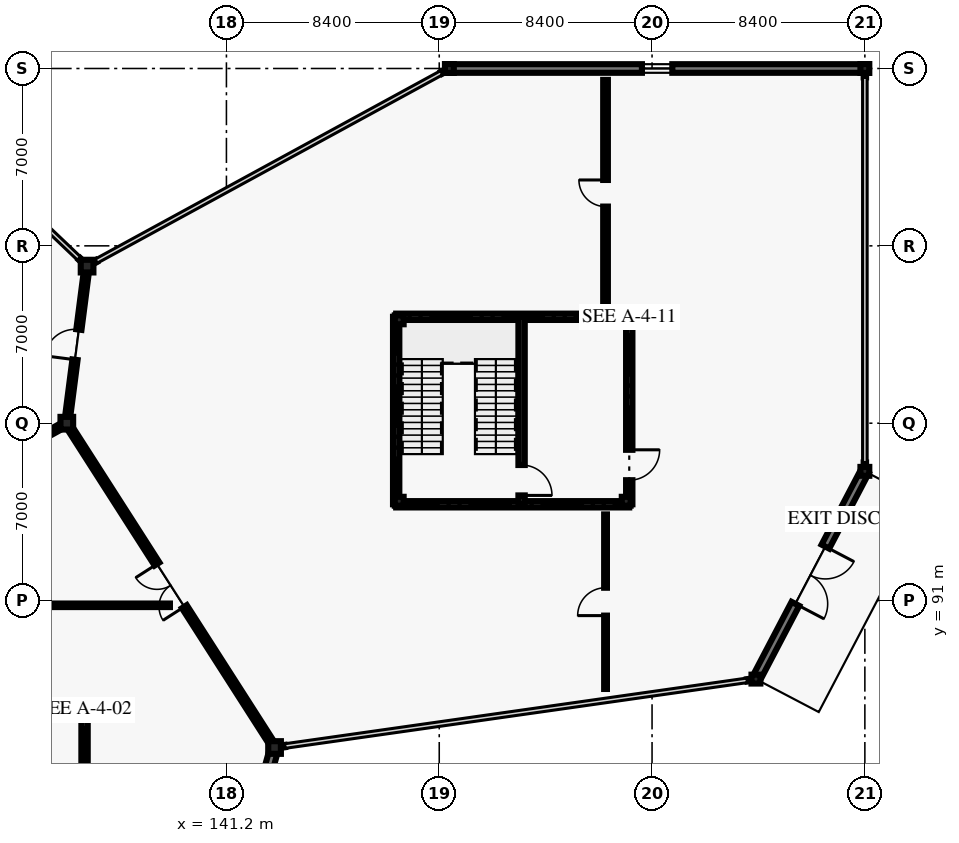
"""IFC4 building model, lengths in metres.
Left out: names, types, materials, properties, quantities, classifications, styles, units other than length and angle.
Written with IfcOpenShell. Run it as: python <this file> out.ifc"""

import sys

from ifc_helpers import new_model, si_unit, direction, frame, frame_2d, origin, origin_2d, place, context, subcontext, project, spatial, rectangle, i_section, extrude, element, fill, save


model = new_model("IFC4")
c1 = context("Model", 3, precision=1e-05, world=origin(), true_north=direction((0.0, 1.0)))
c2 = subcontext(c1, "Body", "Model", "MODEL_VIEW")
j1 = project(units=[si_unit("LENGTHUNIT", "METRE"), si_unit("PLANEANGLEUNIT", "RADIAN")], contexts=[c1])
p1 = place(None, origin())
s1 = spatial("IfcSite", under=j1, at=p1, CompositionType="ELEMENT")
p2 = place(p1, origin())
s2 = spatial("IfcBuilding", under=s1, at=p2, CompositionType="ELEMENT")
p3 = place(p2, origin())
s3 = spatial("IfcBuildingStorey", under=s2, at=p3, CompositionType="ELEMENT", Elevation=0.0)
for number, where, z_axis, x_axis in (
    (1, (134.9, 98.0, 0.0), (0.0, 0.0, 1.0), (1.0, 0.0, 0.0)),
    (2, (135.7, 104.2, 0.0), (0.0, 0.0, 1.0), (1.0, 0.0, 0.0)),
    (3, (143.1, 85.2, 0.0), (0.0, 0.0, 1.0), (1.0, 0.0, 0.0)),
):
    element("IfcColumn", number, at=place(p3, frame(where, z_axis=z_axis, x_axis=x_axis)), inside=s3, PredefinedType="COLUMN", context=c2, shape_type="SweptSolid", body=[
        extrude(i_section(OverallWidth=0.5, OverallDepth=0.5, WebThickness=0.022, FlangeThickness=0.036, at=origin_2d()), origin(), (0.0, 0.0, 1.0), 5.4),
    ])
for number, where, z_axis, x_axis in (
    (4, (150.0, 112.0, 0.0), (0.0, 0.0, 1.0), (1.0, 0.0, 0.0)),
    (5, (162.1, 87.9, 0.0), (0.0, 0.0, 1.0), (1.0, 0.0, 0.0)),
    (6, (166.4, 96.1, 0.0), (0.0, 0.0, 1.0), (1.0, 0.0, 0.0)),
    (7, (166.4, 112.0, 0.0), (0.0, 0.0, 1.0), (1.0, 0.0, 0.0)),
):
    element("IfcColumn", number, at=place(p3, frame(where, z_axis=z_axis, x_axis=x_axis)), inside=s3, PredefinedType="COLUMN", context=c2, shape_type="SweptSolid", body=[
        extrude(i_section(OverallWidth=0.35, OverallDepth=0.35, WebThickness=0.02, FlangeThickness=0.028, at=origin_2d()), origin(), (0.0, 0.0, 1.0), 5.4),
    ])
p4 = place(p3, frame((135.48, 86.58, 0.0), z_axis=(0.0, 0.0, 1.0), x_axis=(1.0, 0.0, 0.0)))
e8 = element("IfcColumn", 8, at=p4, inside=s3, PredefinedType="COLUMN", context=c2, shape_type="SweptSolid", body=[
    extrude(i_section(OverallWidth=0.5, OverallDepth=0.5, WebThickness=0.022, FlangeThickness=0.036, at=origin_2d()), origin(), (0.0, 0.0, 1.0), 5.4),
])
for number, where, z_axis, x_axis in (
    (9, (148.02, 94.92, 0.0), (0.0, 0.0, 1.0), (1.0, 0.0, 0.0)),
    (10, (156.98, 94.92, 0.0), (0.0, 0.0, 1.0), (1.0, 0.0, 0.0)),
    (11, (156.98, 102.08, 0.0), (0.0, 0.0, 1.0), (1.0, 0.0, 0.0)),
    (12, (148.02, 102.08, 0.0), (0.0, 0.0, 1.0), (1.0, 0.0, 0.0)),
):
    element("IfcColumn", number, at=place(p3, frame(where, z_axis=z_axis, x_axis=x_axis)), inside=s3, PredefinedType="COLUMN", context=c2, shape_type="SweptSolid", body=[
        extrude(i_section(OverallWidth=0.35, OverallDepth=0.35, WebThickness=0.02, FlangeThickness=0.028, at=origin_2d()), origin(), (0.0, 0.0, 1.0), 5.4),
    ])
p5 = place(p3, frame((143.084, 85.142, 0.0), z_axis=(0.0, 0.0, 1.0), x_axis=(-0.268810029922, -0.963193214165, 0.0)))
e13 = element("IfcWall", 13, at=p5, inside=s3, PredefinedType="SOLIDWALL", context=c2, shape_type="SweptSolid", body=[
    extrude(rectangle(XDim=13.333, YDim=0.34, at=frame_2d((6.667, 0.0))), origin(), (0.0, 0.0, 1.0), 4.22),
])
p6 = place(p3, frame((135.403, 104.482, 0.0), z_axis=(0.0, 0.0, 1.0), x_axis=(0.726243974232, -0.687437044311, 0.0)))
e14 = element("IfcWall", 14, at=p6, inside=s3, PredefinedType="SOLIDWALL", context=c2, shape_type="SweptSolid", body=[
    extrude(rectangle(XDim=0.308, YDim=0.095, at=frame_2d((0.154, 0.0))), origin(), (0.0, 0.0, 1.0), 4.22),
])
for number, where, z_axis, x_axis in (
    (15, (162.058, 87.894, 0.0), (0.0, 0.0, 1.0), (-0.99, -0.139, 0.0)),
    (16, (143.506, 85.257, 0.0), (0.0, 0.0, 1.0), (-0.99, -0.139, 0.0)),
):
    element("IfcWall", number, at=place(p3, frame(where, z_axis=z_axis, x_axis=x_axis)), inside=s3, PredefinedType="SOLIDWALL", context=c2, shape_type="SweptSolid", body=[
        extrude(rectangle(XDim=0.308, YDim=0.095, at=frame_2d((0.154, 0.0))), origin(), (0.0, 0.0, 1.0), 4.22),
    ])
p7 = place(p3, frame((166.4, 96.1, 0.0), z_axis=(0.0, 0.0, 1.0), x_axis=(-0.464385293852, -0.885633275602, 0.0)))
e17 = element("IfcWall", 17, at=p7, inside=s3, PredefinedType="SOLIDWALL", context=c2, shape_type="SweptSolid", body=[
    extrude(rectangle(XDim=9.259, YDim=0.34, at=frame_2d((4.629, 0.0))), origin(), (0.0, 0.0, 1.0), 4.22),
])
p8 = place(p7, frame((3.355, 0.0, 0.0)))
e18 = element("IfcOpeningElement", 18, at=p8, cuts=e17, PredefinedType="OPENING", context=c2, shape_type="SweptSolid", body=[
    extrude(rectangle(XDim=2.55, YDim=2.5, at=frame_2d((1.275, 1.25))), frame((0.0, 0.18, 0.0), z_axis=(0.0, -1.0, 0.0), x_axis=(1.0, 0.0, 0.0)), (0.0, 0.0, 1.0), 0.36),
])
p9 = place(p3, frame((166.4, 111.958, 0.0), z_axis=(0.0, 0.0, 1.0), x_axis=(0.0, -1.0, 0.0)))
e19 = element("IfcWall", 19, at=p9, inside=s3, PredefinedType="SOLIDWALL", context=c2, shape_type="SweptSolid", body=[
    extrude(rectangle(XDim=0.308, YDim=0.095, at=frame_2d((0.154, 0.0))), origin(), (0.0, 0.0, 1.0), 4.22),
])
p10 = place(p3, frame((166.4, 96.45, 0.0), z_axis=(0.0, 0.0, 1.0), x_axis=(0.0, -1.0, 0.0)))
e20 = element("IfcWall", 20, at=p10, inside=s3, PredefinedType="SOLIDWALL", context=c2, shape_type="SweptSolid", body=[
    extrude(rectangle(XDim=0.308, YDim=0.095, at=frame_2d((0.154, 0.0))), origin(), (0.0, 0.0, 1.0), 4.22),
])
p11 = place(p3, frame((150.0, 112.0, 0.0), z_axis=(0.0, 0.0, 1.0), x_axis=(1.0, 0.0, 0.0)))
e21 = element("IfcWall", 21, at=p11, inside=s3, PredefinedType="SOLIDWALL", context=c2, shape_type="SweptSolid", body=[
    extrude(rectangle(XDim=16.4, YDim=0.34, at=frame_2d((8.2, 0.0))), origin(), (0.0, 0.0, 1.0), 4.22),
])
p12 = place(p11, frame((7.6, 0.0, 0.95)))
e22 = element("IfcOpeningElement", 22, at=p12, cuts=e21, PredefinedType="OPENING", context=c2, shape_type="SweptSolid", body=[
    extrude(rectangle(XDim=1.2, YDim=1.8, at=frame_2d((0.6, 0.9))), frame((0.0, 0.18, 0.0), z_axis=(0.0, -1.0, 0.0), x_axis=(1.0, 0.0, 0.0)), (0.0, 0.0, 1.0), 0.36),
])
p13 = place(p3, frame((135.79, 104.249, 0.0), z_axis=(0.0, 0.0, 1.0), x_axis=(0.876984894636, 0.480517944077, 0.0)))
e23 = element("IfcWall", 23, at=p13, inside=s3, PredefinedType="SOLIDWALL", context=c2, shape_type="SweptSolid", body=[
    extrude(rectangle(XDim=0.308, YDim=0.095, at=frame_2d((0.154, 0.0))), origin(), (0.0, 0.0, 1.0), 4.22),
])
p14 = place(p3, frame((149.693, 111.832, 0.0), z_axis=(0.0, 0.0, 1.0), x_axis=(0.876801617046, 0.480852289529, 0.0)))
e24 = element("IfcWall", 24, at=p14, inside=s3, PredefinedType="SOLIDWALL", context=c2, shape_type="SweptSolid", body=[
    extrude(rectangle(XDim=0.308, YDim=0.095, at=frame_2d((0.154, 0.0))), origin(), (0.0, 0.0, 1.0), 4.22),
])
p15 = place(p3, frame((134.9, 98.0, 0.0), z_axis=(0.0, 0.0, 1.0), x_axis=(-0.875181353329, -0.483794996652, 0.0)))
e25 = element("IfcWall", 25, at=p15, inside=s3, PredefinedType="SOLIDWALL", context=c2, shape_type="SweptSolid", body=[
    extrude(rectangle(XDim=18.396, YDim=0.225, at=frame_2d((9.198, 0.0))), origin(), (0.0, 0.0, 1.0), 4.62),
])
p16 = place(p15, frame((8.098, 0.0, 0.0)))
e26 = element("IfcOpeningElement", 26, at=p16, cuts=e25, PredefinedType="OPENING", context=c2, shape_type="SweptSolid", body=[
    extrude(rectangle(XDim=2.2, YDim=2.6, at=frame_2d((1.1, 1.3))), frame((0.0, 0.123, 0.0), z_axis=(0.0, -1.0, 0.0), x_axis=(1.0, 0.0, 0.0)), (0.0, 0.0, 1.0), 0.245),
])
p17 = place(p3, frame((143.1, 85.2, 0.0), z_axis=(0.0, 0.0, 1.0), x_axis=(-0.539434641352, 0.842027474439, 0.0)))
e27 = element("IfcWall", 27, at=p17, inside=s3, PredefinedType="SOLIDWALL", context=c2, shape_type="SweptSolid", body=[
    extrude(rectangle(XDim=15.201, YDim=0.225, at=frame_2d((7.601, 0.0))), origin(), (0.0, 0.0, 1.0), 4.62),
])
p18 = place(p17, frame((6.601, 0.0, 0.0)))
e28 = element("IfcOpeningElement", 28, at=p18, cuts=e27, PredefinedType="OPENING", context=c2, shape_type="SweptSolid", body=[
    extrude(rectangle(XDim=2.0, YDim=2.5, at=frame_2d((1.0, 1.25))), frame((0.0, 0.123, 0.0), z_axis=(0.0, -1.0, 0.0), x_axis=(1.0, 0.0, 0.0)), (0.0, 0.0, 1.0), 0.245),
])
p19 = place(p3, frame((134.9, 98.0, 0.0), z_axis=(0.0, 0.0, 1.0), x_axis=(0.127980011854, 0.991776747341, 0.0)))
e29 = element("IfcWall", 29, at=p19, inside=s3, PredefinedType="SOLIDWALL", context=c2, shape_type="SweptSolid", body=[
    extrude(rectangle(XDim=6.251, YDim=0.205, at=frame_2d((3.126, 0.0))), origin(), (0.0, 0.0, 1.0), 3.92),
])
p20 = place(p19, frame((2.526, 0.0, 0.0)))
e30 = element("IfcOpeningElement", 30, at=p20, cuts=e29, PredefinedType="OPENING", context=c2, shape_type="SweptSolid", body=[
    extrude(rectangle(XDim=1.2, YDim=2.2, at=frame_2d((0.6, 1.1))), frame((0.0, 0.113, 0.0), z_axis=(0.0, -1.0, 0.0), x_axis=(1.0, 0.0, 0.0)), (0.0, 0.0, 1.0), 0.225),
])
p21 = place(p3, frame((122.829, 90.813, 0.0), z_axis=(0.0, 0.0, 1.0), x_axis=(1.0, 0.0, 0.0)))
e31 = element("IfcWall", 31, at=p21, inside=s3, PredefinedType="PARTITIONING", context=c2, shape_type="SweptSolid", body=[
    extrude(rectangle(XDim=16.141, YDim=0.14, at=frame_2d((8.07, 0.0))), origin(), (0.0, 0.0, 1.0), 3.92),
])
p22 = place(p21, frame((7.581, 0.0, 0.0)))
e32 = element("IfcOpeningElement", 32, at=p22, cuts=e31, PredefinedType="OPENING", context=c2, shape_type="SweptSolid", body=[
    extrude(rectangle(XDim=0.98, YDim=2.15, at=frame_2d((0.49, 1.075))), frame((0.0, 0.08, 0.0), z_axis=(0.0, -1.0, 0.0), x_axis=(1.0, 0.0, 0.0)), (0.0, 0.0, 1.0), 0.16),
])
p23 = place(p3, frame((156.164, 87.511, 0.0), z_axis=(0.0, 0.0, 1.0), x_axis=(0.0, 1.0, 0.0)))
e33 = element("IfcWall", 33, at=p23, inside=s3, PredefinedType="PARTITIONING", context=c2, shape_type="SweptSolid", body=[
    extrude(rectangle(XDim=6.889, YDim=0.11, at=frame_2d((3.444, 0.0))), origin(), (0.0, 0.0, 1.0), 3.92),
])
p24 = place(p23, frame((2.895, 0.0, 0.0)))
e34 = element("IfcOpeningElement", 34, at=p24, cuts=e33, PredefinedType="OPENING", context=c2, shape_type="SweptSolid", body=[
    extrude(rectangle(XDim=1.1, YDim=2.2, at=frame_2d((0.55, 1.1))), frame((0.0, 0.065, 0.0), z_axis=(0.0, -1.0, 0.0), x_axis=(1.0, 0.0, 0.0)), (0.0, 0.0, 1.0), 0.13),
])
p25 = place(p3, frame((156.164, 102.6, 0.0), z_axis=(0.0, 0.0, 1.0), x_axis=(0.0, 1.0, 0.0)))
e35 = element("IfcWall", 35, at=p25, inside=s3, PredefinedType="PARTITIONING", context=c2, shape_type="SweptSolid", body=[
    extrude(rectangle(XDim=8.95, YDim=0.185, at=frame_2d((4.475, 0.0))), origin(), (0.0, 0.0, 1.0), 3.92),
])
p26 = place(p25, frame((3.95, 0.0, 0.0)))
e36 = element("IfcOpeningElement", 36, at=p26, cuts=e35, PredefinedType="OPENING", context=c2, shape_type="SweptSolid", body=[
    extrude(rectangle(XDim=1.05, YDim=2.2, at=frame_2d((0.525, 1.1))), frame((0.0, 0.103, 0.0), z_axis=(0.0, -1.0, 0.0), x_axis=(1.0, 0.0, 0.0)), (0.0, 0.0, 1.0), 0.205),
])
p27 = place(p3, frame((126.4, 86.7, 0.0), z_axis=(0.0, 0.0, 1.0), x_axis=(1.0, 0.0, 0.0)))
e37 = element("IfcWall", 37, at=p27, inside=s3, PredefinedType="SHEAR", context=c2, shape_type="SweptSolid", body=[
    extrude(rectangle(XDim=9.2, YDim=0.25, at=frame_2d((4.6, 0.0))), origin(), (0.0, 0.0, 1.0), 5.16),
])
p28 = place(p3, frame((135.6, 86.7, 0.0), z_axis=(0.0, 0.0, 1.0), x_axis=(0.0, -1.0, 0.0)))
e38 = element("IfcWall", 38, at=p28, inside=s3, PredefinedType="SHEAR", context=c2, shape_type="SweptSolid", body=[
    extrude(rectangle(XDim=7.4, YDim=0.25, at=frame_2d((3.7, 0.0))), origin(), (0.0, 0.0, 1.0), 5.16),
])
p29 = place(p28, frame((5.25, 0.0, 0.0)))
e39 = element("IfcOpeningElement", 39, at=p29, cuts=e38, PredefinedType="OPENING", context=c2, shape_type="SweptSolid", body=[
    extrude(rectangle(XDim=1.2, YDim=2.2, at=frame_2d((0.6, 1.1))), frame((0.0, 0.135, 0.0), z_axis=(0.0, -1.0, 0.0), x_axis=(1.0, 0.0, 0.0)), (0.0, 0.0, 1.0), 0.27),
])
p30 = place(p3, frame((147.9, 94.8, 0.0), z_axis=(0.0, 0.0, 1.0), x_axis=(0.0, 1.0, 0.0)))
e40 = element("IfcWall", 40, at=p30, inside=s3, PredefinedType="SHEAR", context=c2, shape_type="SweptSolid", body=[
    extrude(rectangle(XDim=7.4, YDim=0.25, at=frame_2d((3.7, 0.0))), origin(), (0.0, 0.0, 1.0), 5.16),
])
for number, where, z_axis, x_axis in (
    (41, (147.9, 102.2, 0.0), (0.0, 0.0, 1.0), (1.0, 0.0, 0.0)),
    (42, (157.1, 94.8, 0.0), (0.0, 0.0, 1.0), (-1.0, 0.0, 0.0)),
):
    element("IfcWall", number, at=place(p3, frame(where, z_axis=z_axis, x_axis=x_axis)), inside=s3, PredefinedType="SHEAR", context=c2, shape_type="SweptSolid", body=[
        extrude(rectangle(XDim=9.2, YDim=0.25, at=frame_2d((4.6, 0.0))), origin(), (0.0, 0.0, 1.0), 5.16),
    ])
p31 = place(p3, frame((157.1, 102.2, 0.0), z_axis=(0.0, 0.0, 1.0), x_axis=(0.0, -1.0, 0.0)))
e43 = element("IfcWall", 43, at=p31, inside=s3, PredefinedType="SHEAR", context=c2, shape_type="SweptSolid", body=[
    extrude(rectangle(XDim=7.4, YDim=0.25, at=frame_2d((3.7, 0.0))), origin(), (0.0, 0.0, 1.0), 5.16),
])
p32 = place(p31, frame((5.25, 0.0, 0.0)))
e44 = element("IfcOpeningElement", 44, at=p32, cuts=e43, PredefinedType="OPENING", context=c2, shape_type="SweptSolid", body=[
    extrude(rectangle(XDim=1.2, YDim=2.2, at=frame_2d((0.6, 1.1))), frame((0.0, 0.135, 0.0), z_axis=(0.0, -1.0, 0.0), x_axis=(1.0, 0.0, 0.0)), (0.0, 0.0, 1.0), 0.27),
])
p33 = place(p3, frame((152.85, 102.2, 0.0), z_axis=(0.0, 0.0, 1.0), x_axis=(0.0, -1.0, 0.0)))
e45 = element("IfcWall", 45, at=p33, inside=s3, PredefinedType="SHEAR", context=c2, shape_type="SweptSolid", body=[
    extrude(rectangle(XDim=7.4, YDim=0.25, at=frame_2d((3.7, 0.0))), origin(), (0.0, 0.0, 1.0), 5.16),
])
p34 = place(p33, frame((5.85, 0.0, 0.0)))
e46 = element("IfcOpeningElement", 46, at=p34, cuts=e45, PredefinedType="OPENING", context=c2, shape_type="SweptSolid", body=[
    extrude(rectangle(XDim=1.2, YDim=2.2, at=frame_2d((0.6, 1.1))), frame((0.0, 0.135, 0.0), z_axis=(0.0, -1.0, 0.0), x_axis=(1.0, 0.0, 0.0)), (0.0, 0.0, 1.0), 0.27),
])
p35 = place(p8, origin())
e47 = element("IfcDoor", 47, at=p35, inside=s3, OperationType="DOUBLE_DOOR_SINGLE_SWING", PredefinedType="DOOR", context=c2, shape_type="SweptSolid", body=[
    extrude(rectangle(XDim=2.55, YDim=2.5, at=frame_2d((1.275, 1.25))), frame((0.0, 0.025, 0.0), z_axis=(0.0, -1.0, 0.0), x_axis=(1.0, 0.0, 0.0)), (0.0, 0.0, 1.0), 0.05),
])
fill(e18, e47)
p36 = place(p12, origin())
e48 = element("IfcWindow", 48, at=p36, inside=s3, PartitioningType="SINGLE_PANEL", PredefinedType="WINDOW", context=c2, shape_type="SweptSolid", body=[
    extrude(rectangle(XDim=1.2, YDim=1.8, at=frame_2d((0.6, 0.9))), frame((0.0, 0.03, 0.0), z_axis=(0.0, -1.0, 0.0), x_axis=(1.0, 0.0, 0.0)), (0.0, 0.0, 1.0), 0.06),
])
fill(e22, e48)
p37 = place(p18, origin())
e49 = element("IfcDoor", 49, at=p37, inside=s3, OperationType="DOUBLE_DOOR_SINGLE_SWING", PredefinedType="DOOR", context=c2, shape_type="SweptSolid", body=[
    extrude(rectangle(XDim=2.0, YDim=2.5, at=frame_2d((1.0, 1.25))), frame((0.0, 0.025, 0.0), z_axis=(0.0, -1.0, 0.0), x_axis=(1.0, 0.0, 0.0)), (0.0, 0.0, 1.0), 0.05),
])
fill(e28, e49)
p38 = place(p20, origin())
e50 = element("IfcDoor", 50, at=p38, inside=s3, OperationType="SINGLE_SWING_LEFT", PredefinedType="DOOR", context=c2, shape_type="SweptSolid", body=[
    extrude(rectangle(XDim=1.2, YDim=2.2, at=frame_2d((0.6, 1.1))), frame((0.0, 0.025, 0.0), z_axis=(0.0, -1.0, 0.0), x_axis=(1.0, 0.0, 0.0)), (0.0, 0.0, 1.0), 0.05),
])
fill(e30, e50)
p39 = place(p24, origin())
e51 = element("IfcDoor", 51, at=p39, inside=s3, OperationType="SINGLE_SWING_LEFT", PredefinedType="DOOR", context=c2, shape_type="SweptSolid", body=[
    extrude(rectangle(XDim=1.1, YDim=2.2, at=frame_2d((0.55, 1.1))), frame((0.0, 0.025, 0.0), z_axis=(0.0, -1.0, 0.0), x_axis=(1.0, 0.0, 0.0)), (0.0, 0.0, 1.0), 0.05),
])
fill(e34, e51)
p40 = place(p26, origin())
e52 = element("IfcDoor", 52, at=p40, inside=s3, OperationType="SINGLE_SWING_RIGHT", PredefinedType="DOOR", context=c2, shape_type="SweptSolid", body=[
    extrude(rectangle(XDim=1.05, YDim=2.2, at=frame_2d((0.525, 1.1))), frame((0.0, 0.025, 0.0), z_axis=(0.0, -1.0, 0.0), x_axis=(1.0, 0.0, 0.0)), (0.0, 0.0, 1.0), 0.05),
])
fill(e36, e52)
p41 = place(p32, origin())
e53 = element("IfcDoor", 53, at=p41, inside=s3, OperationType="SINGLE_SWING_LEFT", PredefinedType="DOOR", context=c2, shape_type="SweptSolid", body=[
    extrude(rectangle(XDim=1.2, YDim=2.2, at=frame_2d((0.6, 1.1))), frame((0.0, 0.025, 0.0), z_axis=(0.0, -1.0, 0.0), x_axis=(1.0, 0.0, 0.0)), (0.0, 0.0, 1.0), 0.05),
])
fill(e44, e53)
p42 = place(p34, origin())
e54 = element("IfcDoor", 54, at=p42, inside=s3, OperationType="SINGLE_SWING_RIGHT", PredefinedType="DOOR", context=c2, shape_type="SweptSolid", body=[
    extrude(rectangle(XDim=1.2, YDim=2.2, at=frame_2d((0.6, 1.1))), frame((0.0, 0.025, 0.0), z_axis=(0.0, -1.0, 0.0), x_axis=(1.0, 0.0, 0.0)), (0.0, 0.0, 1.0), 0.05),
])
fill(e46, e54)
save(model, sys.argv[1])
